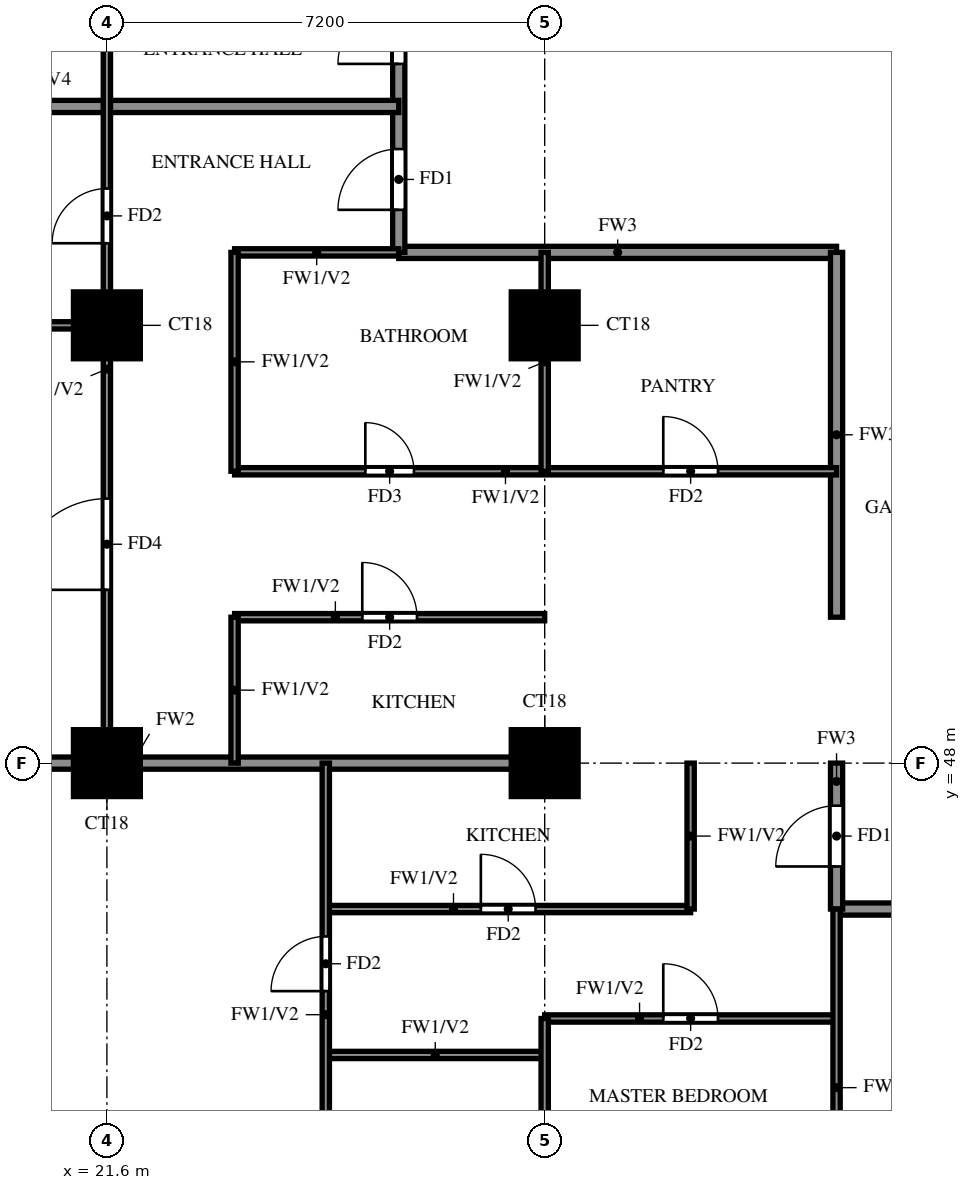
"""IFC4 building model, lengths in metres.
Left out: names, types, materials, properties, quantities, classifications, styles, units other than length and angle.
Written with IfcOpenShell. Run it as: python <this file> out.ifc"""

import sys

from ifc_helpers import new_model, si_unit, direction, frame, frame_2d, origin, origin_2d, place, context, subcontext, project, spatial, rectangle, extrude, source, transform, mapped, element, fill, save


model = new_model("IFC4")
c1 = context("Model", 3, precision=1e-05, world=origin(), true_north=direction((0.0, 1.0)))
c2 = subcontext(c1, "Body", "Model", "MODEL_VIEW")
j1 = project(units=[si_unit("LENGTHUNIT", "METRE"), si_unit("PLANEANGLEUNIT", "RADIAN")], contexts=[c1])
p1 = place(None, origin())
s1 = spatial("IfcSite", under=j1, at=p1, CompositionType="ELEMENT")
p2 = place(p1, origin())
s2 = spatial("IfcBuilding", under=s1, at=p2, CompositionType="ELEMENT")
p3 = place(p2, frame((0.0, 0.0, 123.5)))
s3 = spatial("IfcBuildingStorey", under=s2, at=p3, CompositionType="ELEMENT", Elevation=123.5)
m1 = source(origin(), c2, "Body", "SweptSolid", [
    extrude(rectangle(XDim=1.1, YDim=1.1, at=origin_2d()), origin(), (0.0, 0.0, 1.0), 3.2),
])
for number, where, z_axis, x_axis in (
    (1, (21.6, 48.0, 0.0), (0.0, 0.0, 1.0), (1.0, 0.0, 0.0)),
    (2, (28.8, 48.0, 0.0), (0.0, 0.0, 1.0), (1.0, 0.0, 0.0)),
    (3, (21.6, 55.2, 0.0), (0.0, 0.0, 1.0), (1.0, 0.0, 0.0)),
    (4, (28.8, 55.2, 0.0), (0.0, 0.0, 1.0), (1.0, 0.0, 0.0)),
):
    element("IfcColumn", number, at=place(p3, frame(where, z_axis=z_axis, x_axis=x_axis)), inside=s3, PredefinedType="COLUMN", context=c2, shape_type="MappedRepresentation", body=[
        mapped(m1, transform((0.0, 0.0, 0.0))),
    ])
p4 = place(p3, frame((33.6, 45.6, 0.0), z_axis=(0.0, 0.0, 1.0), x_axis=(1.0, 0.0, 0.0)))
e5 = element("IfcWall", 5, at=p4, inside=s3, PredefinedType="SOLIDWALL", context=c2, shape_type="SweptSolid", body=[
    extrude(rectangle(XDim=7.2, YDim=0.2, at=frame_2d((3.6, 0.0))), origin(), (0.0, 0.0, 1.0), 3.2),
])
p5 = place(p4, frame((3.15, 0.0, 0.0)))
e6 = element("IfcOpeningElement", 6, at=p5, cuts=e5, PredefinedType="OPENING", context=c2, shape_type="SweptSolid", body=[
    extrude(rectangle(XDim=0.9, YDim=2.1, at=frame_2d((0.45, 1.05))), frame((0.0, 0.11, 0.0), z_axis=(0.0, -1.0, 0.0), x_axis=(1.0, 0.0, 0.0)), (0.0, 0.0, 1.0), 0.22),
])
p6 = place(p3, frame((26.4, 56.4, 0.0), z_axis=(0.0, 0.0, 1.0), x_axis=(1.0, 0.0, 0.0)))
e7 = element("IfcWall", 7, at=p6, inside=s3, PredefinedType="SOLIDWALL", context=c2, shape_type="SweptSolid", body=[
    extrude(rectangle(XDim=7.2, YDim=0.2, at=frame_2d((3.6, 0.0))), origin(), (0.0, 0.0, 1.0), 3.2),
])
p7 = place(p3, frame((26.4, 56.4, 0.0), z_axis=(0.0, 0.0, 1.0), x_axis=(0.0, 1.0, 0.0)))
e8 = element("IfcWall", 8, at=p7, inside=s3, PredefinedType="SOLIDWALL", context=c2, shape_type="SweptSolid", body=[
    extrude(rectangle(XDim=9.6, YDim=0.2, at=frame_2d((4.8, 0.0))), origin(), (0.0, 0.0, 1.0), 3.2),
])
p8 = place(p7, frame((0.7, 0.0, 0.0)))
e9 = element("IfcOpeningElement", 9, at=p8, cuts=e8, PredefinedType="OPENING", context=c2, shape_type="SweptSolid", body=[
    extrude(rectangle(XDim=1.0, YDim=2.1, at=frame_2d((0.5, 1.05))), frame((0.0, 0.11, 0.0), z_axis=(0.0, -1.0, 0.0), x_axis=(1.0, 0.0, 0.0)), (0.0, 0.0, 1.0), 0.22),
])
p9 = place(p7, frame((3.1, 0.0, 0.0)))
e10 = element("IfcOpeningElement", 10, at=p9, cuts=e8, PredefinedType="OPENING", context=c2, shape_type="SweptSolid", body=[
    extrude(rectangle(XDim=1.0, YDim=2.1, at=frame_2d((0.5, 1.05))), frame((0.0, 0.11, 0.0), z_axis=(0.0, -1.0, 0.0), x_axis=(1.0, 0.0, 0.0)), (0.0, 0.0, 1.0), 0.22),
])
p10 = place(p3, frame((33.6, 45.6, 0.0), z_axis=(0.0, 0.0, 1.0), x_axis=(0.0, 1.0, 0.0)))
e11 = element("IfcWall", 11, at=p10, inside=s3, PredefinedType="SOLIDWALL", context=c2, shape_type="SweptSolid", body=[
    extrude(rectangle(XDim=2.4, YDim=0.2, at=frame_2d((1.2, 0.0))), origin(), (0.0, 0.0, 1.0), 3.2),
])
p11 = place(p10, frame((0.7, 0.0, 0.0)))
e12 = element("IfcOpeningElement", 12, at=p11, cuts=e11, PredefinedType="OPENING", context=c2, shape_type="SweptSolid", body=[
    extrude(rectangle(XDim=1.0, YDim=2.1, at=frame_2d((0.5, 1.05))), frame((0.0, 0.11, 0.0), z_axis=(0.0, -1.0, 0.0), x_axis=(1.0, 0.0, 0.0)), (0.0, 0.0, 1.0), 0.22),
])
p12 = place(p3, frame((33.6, 50.4, 0.0), z_axis=(0.0, 0.0, 1.0), x_axis=(0.0, 1.0, 0.0)))
e13 = element("IfcWall", 13, at=p12, inside=s3, PredefinedType="SOLIDWALL", context=c2, shape_type="SweptSolid", body=[
    extrude(rectangle(XDim=6.0, YDim=0.2, at=frame_2d((3.0, 0.0))), origin(), (0.0, 0.0, 1.0), 3.2),
])
p13 = place(p3, frame((14.525, 48.0, 0.0), z_axis=(0.0, 0.0, 1.0), x_axis=(1.0, 0.0, 0.0)))
e14 = element("IfcWall", 14, at=p13, inside=s3, PredefinedType="SOLIDWALL", context=c2, shape_type="SweptSolid", body=[
    extrude(rectangle(XDim=14.275, YDim=0.2, at=frame_2d((7.138, 0.0))), origin(), (0.0, 0.0, 1.0), 3.2),
])
p14 = place(p3, frame((14.525, 58.8, 0.0), z_axis=(0.0, 0.0, 1.0), x_axis=(1.0, 0.0, 0.0)))
e15 = element("IfcWall", 15, at=p14, inside=s3, PredefinedType="SOLIDWALL", context=c2, shape_type="SweptSolid", body=[
    extrude(rectangle(XDim=11.875, YDim=0.2, at=frame_2d((5.938, 0.0))), origin(), (0.0, 0.0, 1.0), 2.3),
])
p15 = place(p3, frame((25.2, 43.2, 0.0), z_axis=(0.0, 0.0, 1.0), x_axis=(1.0, 0.0, 0.0)))
e16 = element("IfcWall", 16, at=p15, inside=s3, PredefinedType="PARTITIONING", context=c2, shape_type="SweptSolid", body=[
    extrude(rectangle(XDim=3.6, YDim=0.12, at=frame_2d((1.8, 0.0))), origin(), (0.0, 0.0, 1.0), 3.2),
])
p16 = place(p3, frame((28.8, 43.8, 0.0), z_axis=(0.0, 0.0, 1.0), x_axis=(1.0, 0.0, 0.0)))
e17 = element("IfcWall", 17, at=p16, inside=s3, PredefinedType="PARTITIONING", context=c2, shape_type="SweptSolid", body=[
    extrude(rectangle(XDim=4.8, YDim=0.12, at=frame_2d((2.4, 0.0))), origin(), (0.0, 0.0, 1.0), 3.2),
])
p17 = place(p16, frame((1.95, 0.0, 0.0)))
e18 = element("IfcOpeningElement", 18, at=p17, cuts=e17, PredefinedType="OPENING", context=c2, shape_type="SweptSolid", body=[
    extrude(rectangle(XDim=0.9, YDim=2.1, at=frame_2d((0.45, 1.05))), frame((0.0, 0.07, 0.0), z_axis=(0.0, -1.0, 0.0), x_axis=(1.0, 0.0, 0.0)), (0.0, 0.0, 1.0), 0.14),
])
p18 = place(p3, frame((25.2, 45.6, 0.0), z_axis=(0.0, 0.0, 1.0), x_axis=(1.0, 0.0, 0.0)))
e19 = element("IfcWall", 19, at=p18, inside=s3, PredefinedType="PARTITIONING", context=c2, shape_type="SweptSolid", body=[
    extrude(rectangle(XDim=6.0, YDim=0.12, at=frame_2d((3.0, 0.0))), origin(), (0.0, 0.0, 1.0), 3.2),
])
p19 = place(p18, frame((2.55, 0.0, 0.0)))
e20 = element("IfcOpeningElement", 20, at=p19, cuts=e19, PredefinedType="OPENING", context=c2, shape_type="SweptSolid", body=[
    extrude(rectangle(XDim=0.9, YDim=2.1, at=frame_2d((0.45, 1.05))), frame((0.0, 0.07, 0.0), z_axis=(0.0, -1.0, 0.0), x_axis=(1.0, 0.0, 0.0)), (0.0, 0.0, 1.0), 0.14),
])
p20 = place(p3, frame((23.7, 50.4, 0.0), z_axis=(0.0, 0.0, 1.0), x_axis=(1.0, 0.0, 0.0)))
e21 = element("IfcWall", 21, at=p20, inside=s3, PredefinedType="PARTITIONING", context=c2, shape_type="SweptSolid", body=[
    extrude(rectangle(XDim=5.1, YDim=0.12, at=frame_2d((2.55, 0.0))), origin(), (0.0, 0.0, 1.0), 3.2),
])
p21 = place(p20, frame((2.1, 0.0, 0.0)))
e22 = element("IfcOpeningElement", 22, at=p21, cuts=e21, PredefinedType="OPENING", context=c2, shape_type="SweptSolid", body=[
    extrude(rectangle(XDim=0.9, YDim=2.1, at=frame_2d((0.45, 1.05))), frame((0.0, 0.07, 0.0), z_axis=(0.0, -1.0, 0.0), x_axis=(1.0, 0.0, 0.0)), (0.0, 0.0, 1.0), 0.14),
])
p22 = place(p3, frame((23.7, 52.8, 0.0), z_axis=(0.0, 0.0, 1.0), x_axis=(1.0, 0.0, 0.0)))
e23 = element("IfcWall", 23, at=p22, inside=s3, PredefinedType="PARTITIONING", context=c2, shape_type="SweptSolid", body=[
    extrude(rectangle(XDim=9.9, YDim=0.12, at=frame_2d((4.95, 0.0))), origin(), (0.0, 0.0, 1.0), 3.2),
])
p23 = place(p22, frame((2.15, 0.0, 0.0)))
e24 = element("IfcOpeningElement", 24, at=p23, cuts=e23, PredefinedType="OPENING", context=c2, shape_type="SweptSolid", body=[
    extrude(rectangle(XDim=0.8, YDim=2.1, at=frame_2d((0.4, 1.05))), frame((0.0, 0.07, 0.0), z_axis=(0.0, -1.0, 0.0), x_axis=(1.0, 0.0, 0.0)), (0.0, 0.0, 1.0), 0.14),
])
p24 = place(p22, frame((7.05, 0.0, 0.0)))
e25 = element("IfcOpeningElement", 25, at=p24, cuts=e23, PredefinedType="OPENING", context=c2, shape_type="SweptSolid", body=[
    extrude(rectangle(XDim=0.9, YDim=2.1, at=frame_2d((0.45, 1.05))), frame((0.0, 0.07, 0.0), z_axis=(0.0, -1.0, 0.0), x_axis=(1.0, 0.0, 0.0)), (0.0, 0.0, 1.0), 0.14),
])
p25 = place(p3, frame((14.525, 55.2, 0.0), z_axis=(0.0, 0.0, 1.0), x_axis=(1.0, 0.0, 0.0)))
e26 = element("IfcWall", 26, at=p25, inside=s3, PredefinedType="PARTITIONING", context=c2, shape_type="SweptSolid", body=[
    extrude(rectangle(XDim=7.075, YDim=0.12, at=frame_2d((3.538, 0.0))), origin(), (0.0, 0.0, 1.0), 3.2),
])
p26 = place(p3, frame((23.7, 56.4, 0.0), z_axis=(0.0, 0.0, 1.0), x_axis=(1.0, 0.0, 0.0)))
e27 = element("IfcWall", 27, at=p26, inside=s3, PredefinedType="PARTITIONING", context=c2, shape_type="SweptSolid", body=[
    extrude(rectangle(XDim=2.7, YDim=0.12, at=frame_2d((1.35, 0.0))), origin(), (0.0, 0.0, 1.0), 3.2),
])
p27 = place(p3, frame((21.6, 48.0, 0.0), z_axis=(0.0, 0.0, 1.0), x_axis=(0.0, 1.0, 0.0)))
e28 = element("IfcWall", 28, at=p27, inside=s3, PredefinedType="PARTITIONING", context=c2, shape_type="SweptSolid", body=[
    extrude(rectangle(XDim=14.4, YDim=0.12, at=frame_2d((7.2, 0.0))), origin(), (0.0, 0.0, 1.0), 3.2),
])
p28 = place(p27, frame((2.85, 0.0, 0.0)))
e29 = element("IfcOpeningElement", 29, at=p28, cuts=e28, PredefinedType="OPENING", context=c2, shape_type="SweptSolid", body=[
    extrude(rectangle(XDim=1.5, YDim=2.1, at=frame_2d((0.75, 1.05))), frame((0.0, 0.07, 0.0), z_axis=(0.0, -1.0, 0.0), x_axis=(1.0, 0.0, 0.0)), (0.0, 0.0, 1.0), 0.14),
])
p29 = place(p27, frame((8.55, 0.0, 0.0)))
e30 = element("IfcOpeningElement", 30, at=p29, cuts=e28, PredefinedType="OPENING", context=c2, shape_type="SweptSolid", body=[
    extrude(rectangle(XDim=0.9, YDim=2.1, at=frame_2d((0.45, 1.05))), frame((0.0, 0.07, 0.0), z_axis=(0.0, -1.0, 0.0), x_axis=(1.0, 0.0, 0.0)), (0.0, 0.0, 1.0), 0.14),
])
p30 = place(p27, frame((12.15, 0.0, 0.0)))
e31 = element("IfcOpeningElement", 31, at=p30, cuts=e28, PredefinedType="OPENING", context=c2, shape_type="SweptSolid", body=[
    extrude(rectangle(XDim=0.9, YDim=2.1, at=frame_2d((0.45, 1.05))), frame((0.0, 0.07, 0.0), z_axis=(0.0, -1.0, 0.0), x_axis=(1.0, 0.0, 0.0)), (0.0, 0.0, 1.0), 0.14),
])
p31 = place(p3, frame((23.7, 48.0, 0.0), z_axis=(0.0, 0.0, 1.0), x_axis=(0.0, 1.0, 0.0)))
e32 = element("IfcWall", 32, at=p31, inside=s3, PredefinedType="PARTITIONING", context=c2, shape_type="SweptSolid", body=[
    extrude(rectangle(XDim=2.4, YDim=0.12, at=frame_2d((1.2, 0.0))), origin(), (0.0, 0.0, 1.0), 3.2),
])
p32 = place(p3, frame((23.7, 52.8, 0.0), z_axis=(0.0, 0.0, 1.0), x_axis=(0.0, 1.0, 0.0)))
e33 = element("IfcWall", 33, at=p32, inside=s3, PredefinedType="PARTITIONING", context=c2, shape_type="SweptSolid", body=[
    extrude(rectangle(XDim=3.6, YDim=0.12, at=frame_2d((1.8, 0.0))), origin(), (0.0, 0.0, 1.0), 3.2),
])
p33 = place(p3, frame((25.2, 39.725, 0.0), z_axis=(0.0, 0.0, 1.0), x_axis=(0.0, 1.0, 0.0)))
e34 = element("IfcWall", 34, at=p33, inside=s3, PredefinedType="PARTITIONING", context=c2, shape_type="SweptSolid", body=[
    extrude(rectangle(XDim=8.275, YDim=0.12, at=frame_2d((4.137, 0.0))), origin(), (0.0, 0.0, 1.0), 3.2),
])
p34 = place(p33, frame((4.525, 0.0, 0.0)))
e35 = element("IfcOpeningElement", 35, at=p34, cuts=e34, PredefinedType="OPENING", context=c2, shape_type="SweptSolid", body=[
    extrude(rectangle(XDim=0.9, YDim=2.1, at=frame_2d((0.45, 1.05))), frame((0.0, 0.07, 0.0), z_axis=(0.0, -1.0, 0.0), x_axis=(1.0, 0.0, 0.0)), (0.0, 0.0, 1.0), 0.14),
])
p35 = place(p3, frame((28.8, 39.725, 0.0), z_axis=(0.0, 0.0, 1.0), x_axis=(0.0, 1.0, 0.0)))
e36 = element("IfcWall", 36, at=p35, inside=s3, PredefinedType="PARTITIONING", context=c2, shape_type="SweptSolid", body=[
    extrude(rectangle(XDim=4.075, YDim=0.12, at=frame_2d((2.038, 0.0))), origin(), (0.0, 0.0, 1.0), 3.2),
])
p36 = place(p35, frame((1.738, 0.0, 0.0)))
e37 = element("IfcOpeningElement", 37, at=p36, cuts=e36, PredefinedType="OPENING", context=c2, shape_type="SweptSolid", body=[
    extrude(rectangle(XDim=0.8, YDim=2.1, at=frame_2d((0.4, 1.05))), frame((0.0, 0.07, 0.0), z_axis=(0.0, -1.0, 0.0), x_axis=(1.0, 0.0, 0.0)), (0.0, 0.0, 1.0), 0.14),
])
p37 = place(p3, frame((28.8, 52.8, 0.0), z_axis=(0.0, 0.0, 1.0), x_axis=(0.0, 1.0, 0.0)))
e38 = element("IfcWall", 38, at=p37, inside=s3, PredefinedType="PARTITIONING", context=c2, shape_type="SweptSolid", body=[
    extrude(rectangle(XDim=3.6, YDim=0.12, at=frame_2d((1.8, 0.0))), origin(), (0.0, 0.0, 1.0), 3.2),
])
p38 = place(p3, frame((31.2, 45.6, 0.0), z_axis=(0.0, 0.0, 1.0), x_axis=(0.0, 1.0, 0.0)))
e39 = element("IfcWall", 39, at=p38, inside=s3, PredefinedType="PARTITIONING", context=c2, shape_type="SweptSolid", body=[
    extrude(rectangle(XDim=2.4, YDim=0.12, at=frame_2d((1.2, 0.0))), origin(), (0.0, 0.0, 1.0), 3.2),
])
p39 = place(p3, frame((33.6, 39.725, 0.0), z_axis=(0.0, 0.0, 1.0), x_axis=(0.0, 1.0, 0.0)))
e40 = element("IfcWall", 40, at=p39, inside=s3, PredefinedType="PARTITIONING", context=c2, shape_type="SweptSolid", body=[
    extrude(rectangle(XDim=5.875, YDim=0.12, at=frame_2d((2.938, 0.0))), origin(), (0.0, 0.0, 1.0), 3.2),
])
p40 = place(p11, origin())
e41 = element("IfcDoor", 41, at=p40, inside=s3, OperationType="SINGLE_SWING_LEFT", PredefinedType="DOOR", context=c2, shape_type="SweptSolid", body=[
    extrude(rectangle(XDim=1.0, YDim=2.1, at=frame_2d((0.5, 1.05))), frame((0.0, 0.025, 0.0), z_axis=(0.0, -1.0, 0.0), x_axis=(1.0, 0.0, 0.0)), (0.0, 0.0, 1.0), 0.05),
])
fill(e12, e41)
p41 = place(p34, origin())
e42 = element("IfcDoor", 42, at=p41, inside=s3, OperationType="SINGLE_SWING_RIGHT", PredefinedType="DOOR", context=c2, shape_type="SweptSolid", body=[
    extrude(rectangle(XDim=0.9, YDim=2.1, at=frame_2d((0.45, 1.05))), frame((0.0, 0.025, 0.0), z_axis=(0.0, -1.0, 0.0), x_axis=(1.0, 0.0, 0.0)), (0.0, 0.0, 1.0), 0.05),
])
fill(e35, e42)
p42 = place(p17, origin())
e43 = element("IfcDoor", 43, at=p42, inside=s3, OperationType="SINGLE_SWING_LEFT", PredefinedType="DOOR", context=c2, shape_type="SweptSolid", body=[
    extrude(rectangle(XDim=0.9, YDim=2.1, at=frame_2d((0.45, 1.05))), frame((0.0, 0.025, 0.0), z_axis=(0.0, -1.0, 0.0), x_axis=(1.0, 0.0, 0.0)), (0.0, 0.0, 1.0), 0.05),
])
fill(e18, e43)
p43 = place(p19, origin())
e44 = element("IfcDoor", 44, at=p43, inside=s3, OperationType="SINGLE_SWING_RIGHT", PredefinedType="DOOR", context=c2, shape_type="SweptSolid", body=[
    extrude(rectangle(XDim=0.9, YDim=2.1, at=frame_2d((0.45, 1.05))), frame((0.0, 0.025, 0.0), z_axis=(0.0, -1.0, 0.0), x_axis=(1.0, 0.0, 0.0)), (0.0, 0.0, 1.0), 0.05),
])
fill(e20, e44)
p44 = place(p8, origin())
e45 = element("IfcDoor", 45, at=p44, inside=s3, OperationType="SINGLE_SWING_LEFT", PredefinedType="DOOR", context=c2, shape_type="SweptSolid", body=[
    extrude(rectangle(XDim=1.0, YDim=2.1, at=frame_2d((0.5, 1.05))), frame((0.0, 0.025, 0.0), z_axis=(0.0, -1.0, 0.0), x_axis=(1.0, 0.0, 0.0)), (0.0, 0.0, 1.0), 0.05),
])
fill(e9, e45)
p45 = place(p28, origin())
e46 = element("IfcDoor", 46, at=p45, inside=s3, OperationType="SINGLE_SWING_RIGHT", PredefinedType="DOOR", context=c2, shape_type="SweptSolid", body=[
    extrude(rectangle(XDim=1.5, YDim=2.1, at=frame_2d((0.75, 1.05))), frame((0.0, 0.025, 0.0), z_axis=(0.0, -1.0, 0.0), x_axis=(1.0, 0.0, 0.0)), (0.0, 0.0, 1.0), 0.05),
])
fill(e29, e46)
p46 = place(p29, origin())
e47 = element("IfcDoor", 47, at=p46, inside=s3, OperationType="SINGLE_SWING_LEFT", PredefinedType="DOOR", context=c2, shape_type="SweptSolid", body=[
    extrude(rectangle(XDim=0.9, YDim=2.1, at=frame_2d((0.45, 1.05))), frame((0.0, 0.025, 0.0), z_axis=(0.0, -1.0, 0.0), x_axis=(1.0, 0.0, 0.0)), (0.0, 0.0, 1.0), 0.05),
])
fill(e30, e47)
p47 = place(p21, origin())
e48 = element("IfcDoor", 48, at=p47, inside=s3, OperationType="SINGLE_SWING_LEFT", PredefinedType="DOOR", context=c2, shape_type="SweptSolid", body=[
    extrude(rectangle(XDim=0.9, YDim=2.1, at=frame_2d((0.45, 1.05))), frame((0.0, 0.025, 0.0), z_axis=(0.0, -1.0, 0.0), x_axis=(1.0, 0.0, 0.0)), (0.0, 0.0, 1.0), 0.05),
])
fill(e22, e48)
p48 = place(p23, origin())
e49 = element("IfcDoor", 49, at=p48, inside=s3, OperationType="SINGLE_SWING_RIGHT", PredefinedType="DOOR", context=c2, shape_type="SweptSolid", body=[
    extrude(rectangle(XDim=0.8, YDim=2.1, at=frame_2d((0.4, 1.05))), frame((0.0, 0.025, 0.0), z_axis=(0.0, -1.0, 0.0), x_axis=(1.0, 0.0, 0.0)), (0.0, 0.0, 1.0), 0.05),
])
fill(e24, e49)
p49 = place(p24, origin())
e50 = element("IfcDoor", 50, at=p49, inside=s3, OperationType="SINGLE_SWING_LEFT", PredefinedType="DOOR", context=c2, shape_type="SweptSolid", body=[
    extrude(rectangle(XDim=0.9, YDim=2.1, at=frame_2d((0.45, 1.05))), frame((0.0, 0.025, 0.0), z_axis=(0.0, -1.0, 0.0), x_axis=(1.0, 0.0, 0.0)), (0.0, 0.0, 1.0), 0.05),
])
fill(e25, e50)
p50 = place(p9, origin())
e51 = element("IfcDoor", 51, at=p50, inside=s3, OperationType="SINGLE_SWING_LEFT", PredefinedType="DOOR", context=c2, shape_type="SweptSolid", body=[
    extrude(rectangle(XDim=1.0, YDim=2.1, at=frame_2d((0.5, 1.05))), frame((0.0, 0.025, 0.0), z_axis=(0.0, -1.0, 0.0), x_axis=(1.0, 0.0, 0.0)), (0.0, 0.0, 1.0), 0.05),
])
fill(e10, e51)
save(model, sys.argv[1])
